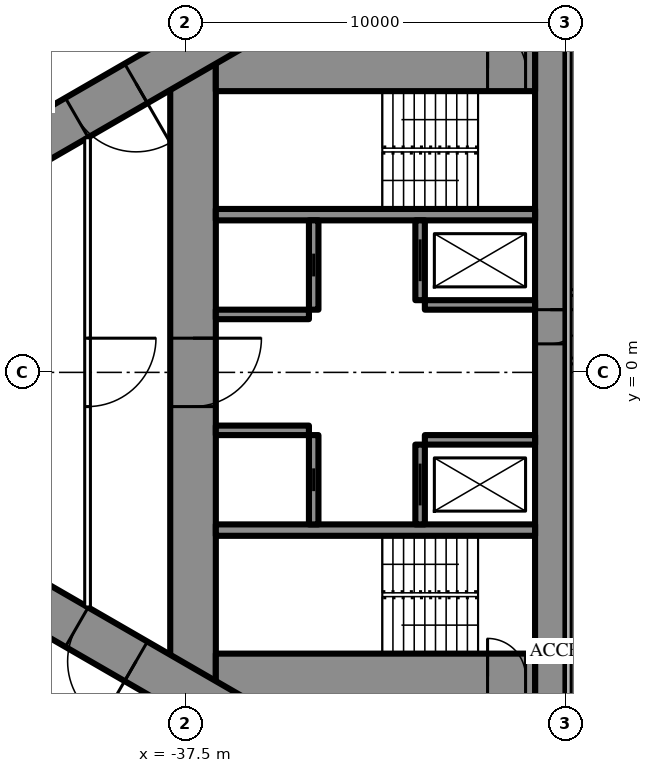
"""IFC4 building model, lengths in metres.
Left out: names, types, materials, properties, quantities, classifications, styles, units other than length and angle.
Written with IfcOpenShell. Run it as: python <this file> out.ifc"""

import sys

from ifc_helpers import new_model, si_unit, direction, frame, frame_2d, origin, place, context, subcontext, project, spatial, rectangle, extrude, element, fill, save


model = new_model("IFC4")
c1 = context("Model", 3, precision=1e-05, world=origin(), true_north=direction((0.0, 1.0)))
c2 = subcontext(c1, "Body", "Model", "MODEL_VIEW")
j1 = project(units=[si_unit("LENGTHUNIT", "METRE"), si_unit("PLANEANGLEUNIT", "RADIAN")], contexts=[c1])
p1 = place(None, origin())
s1 = spatial("IfcSite", under=j1, at=p1, CompositionType="ELEMENT")
p2 = place(p1, origin())
s2 = spatial("IfcBuilding", under=s1, at=p2, CompositionType="ELEMENT")
p3 = place(p2, frame((0.0, 0.0, 226.1)))
s3 = spatial("IfcBuildingStorey", under=s2, at=p3, CompositionType="ELEMENT", Elevation=226.1)
p4 = place(p3, frame((-27.9, 8.6, 0.0), z_axis=(0.0, 0.0, 1.0), x_axis=(0.0, -1.0, 0.0)))
e1 = element("IfcWall", 1, at=p4, inside=s3, PredefinedType="SHEAR", context=c2, shape_type="SweptSolid", body=[
    extrude(rectangle(XDim=17.2, YDim=0.8, at=frame_2d((8.6, 0.0))), origin(), (0.0, 0.0, 1.0), 3.6),
])
p5 = place(p4, frame((6.95, 0.0, 0.0)))
e2 = element("IfcOpeningElement", 2, at=p5, cuts=e1, PredefinedType="OPENING", context=c2, shape_type="SweptSolid", body=[
    extrude(rectangle(XDim=0.9, YDim=2.2, at=frame_2d((0.45, 1.1))), frame((0.0, 0.41, 0.0), z_axis=(0.0, -1.0, 0.0), x_axis=(1.0, 0.0, 0.0)), (0.0, 0.0, 1.0), 0.82),
])
p6 = place(p3, frame((-37.3, 8.6, 0.0), z_axis=(0.0, 0.0, 1.0), x_axis=(0.0, -1.0, 0.0)))
e3 = element("IfcWall", 3, at=p6, inside=s3, PredefinedType="SHEAR", context=c2, shape_type="SweptSolid", body=[
    extrude(rectangle(XDim=17.2, YDim=1.2, at=frame_2d((8.6, 0.0))), origin(), (0.0, 0.0, 1.0), 3.6),
])
p7 = place(p6, frame((7.7, 0.0, 0.0)))
e4 = element("IfcOpeningElement", 4, at=p7, cuts=e3, PredefinedType="OPENING", context=c2, shape_type="SweptSolid", body=[
    extrude(rectangle(XDim=1.8, YDim=2.2, at=frame_2d((0.9, 1.1))), frame((0.0, 0.61, 0.0), z_axis=(0.0, -1.0, 0.0), x_axis=(1.0, 0.0, 0.0)), (0.0, 0.0, 1.0), 1.22),
])
p8 = place(p3, frame((-28.3, 8.0, 0.0), z_axis=(0.0, 0.0, 1.0), x_axis=(-1.0, 0.0, 0.0)))
e5 = element("IfcWall", 5, at=p8, inside=s3, PredefinedType="SHEAR", context=c2, shape_type="SweptSolid", body=[
    extrude(rectangle(XDim=8.4, YDim=1.2, at=frame_2d((4.2, 0.0))), origin(), (0.0, 0.0, 1.0), 3.6),
])
p9 = place(p8, frame((0.25, 0.0, 0.0)))
e6 = element("IfcOpeningElement", 6, at=p9, cuts=e5, PredefinedType="OPENING", context=c2, shape_type="SweptSolid", body=[
    extrude(rectangle(XDim=1.0, YDim=2.2, at=frame_2d((0.5, 1.1))), frame((0.0, 0.61, 0.0), z_axis=(0.0, -1.0, 0.0), x_axis=(1.0, 0.0, 0.0)), (0.0, 0.0, 1.0), 1.22),
])
p10 = place(p3, frame((-28.3, -8.0, 0.0), z_axis=(0.0, 0.0, 1.0), x_axis=(-1.0, 0.0, 0.0)))
e7 = element("IfcWall", 7, at=p10, inside=s3, PredefinedType="SHEAR", context=c2, shape_type="SweptSolid", body=[
    extrude(rectangle(XDim=8.4, YDim=1.2, at=frame_2d((4.2, 0.0))), origin(), (0.0, 0.0, 1.0), 3.6),
])
p11 = place(p10, frame((0.25, 0.0, 0.0)))
e8 = element("IfcOpeningElement", 8, at=p11, cuts=e7, PredefinedType="OPENING", context=c2, shape_type="SweptSolid", body=[
    extrude(rectangle(XDim=1.0, YDim=2.2, at=frame_2d((0.5, 1.1))), frame((0.0, 0.61, 0.0), z_axis=(0.0, -1.0, 0.0), x_axis=(1.0, 0.0, 0.0)), (0.0, 0.0, 1.0), 1.22),
])
for number, where, z_axis, x_axis in (
    (9, (-28.3, 4.15, 0.0), (0.0, 0.0, 1.0), (-1.0, 0.0, 0.0)),
    (10, (-28.3, -4.15, 0.0), (0.0, 0.0, 1.0), (-1.0, 0.0, 0.0)),
):
    element("IfcWall", number, at=place(p3, frame(where, z_axis=z_axis, x_axis=x_axis)), inside=s3, PredefinedType="SHEAR", context=c2, shape_type="SweptSolid", body=[
        extrude(rectangle(XDim=8.4, YDim=0.3, at=frame_2d((4.2, 0.0))), origin(), (0.0, 0.0, 1.0), 3.6),
    ])
p12 = place(p3, frame((-31.325, 4.0, 0.0), z_axis=(0.0, 0.0, 1.0), x_axis=(0.0, -1.0, 0.0)))
e11 = element("IfcWall", 11, at=p12, inside=s3, PredefinedType="SHEAR", context=c2, shape_type="SweptSolid", body=[
    extrude(rectangle(XDim=2.1, YDim=0.25, at=frame_2d((1.05, 0.0))), origin(), (0.0, 0.0, 1.0), 3.6),
])
p13 = place(p12, frame((0.5, 0.0, 0.0)))
e12 = element("IfcOpeningElement", 12, at=p13, cuts=e11, PredefinedType="OPENING", context=c2, shape_type="SweptSolid", body=[
    extrude(rectangle(XDim=1.1, YDim=2.2, at=frame_2d((0.55, 1.1))), frame((0.0, 0.135, 0.0), z_axis=(0.0, -1.0, 0.0), x_axis=(1.0, 0.0, 0.0)), (0.0, 0.0, 1.0), 0.27),
])
p14 = place(p3, frame((-34.125, 4.0, 0.0), z_axis=(0.0, 0.0, 1.0), x_axis=(0.0, -1.0, 0.0)))
e13 = element("IfcWall", 13, at=p14, inside=s3, PredefinedType="SHEAR", context=c2, shape_type="SweptSolid", body=[
    extrude(rectangle(XDim=2.35, YDim=0.25, at=frame_2d((1.175, 0.0))), origin(), (0.0, 0.0, 1.0), 3.6),
])
p15 = place(p14, frame((0.875, 0.0, 0.0)))
e14 = element("IfcOpeningElement", 14, at=p15, cuts=e13, PredefinedType="OPENING", context=c2, shape_type="SweptSolid", body=[
    extrude(rectangle(XDim=0.6, YDim=2.0, at=frame_2d((0.3, 1.0))), frame((0.0, 0.135, 0.0), z_axis=(0.0, -1.0, 0.0), x_axis=(1.0, 0.0, 0.0)), (0.0, 0.0, 1.0), 0.27),
])
p16 = place(p3, frame((-28.3, 1.775, 0.0), z_axis=(0.0, 0.0, 1.0), x_axis=(-1.0, 0.0, 0.0)))
e15 = element("IfcWall", 15, at=p16, inside=s3, PredefinedType="SHEAR", context=c2, shape_type="SweptSolid", body=[
    extrude(rectangle(XDim=2.9, YDim=0.25, at=frame_2d((1.45, 0.0))), origin(), (0.0, 0.0, 1.0), 3.6),
])
p17 = place(p3, frame((-34.25, 1.525, 0.0), z_axis=(0.0, 0.0, 1.0), x_axis=(-1.0, 0.0, 0.0)))
e16 = element("IfcWall", 16, at=p17, inside=s3, PredefinedType="SHEAR", context=c2, shape_type="SweptSolid", body=[
    extrude(rectangle(XDim=2.45, YDim=0.25, at=frame_2d((1.225, 0.0))), origin(), (0.0, 0.0, 1.0), 3.6),
])
p18 = place(p3, frame((-31.325, -1.9, 0.0), z_axis=(0.0, 0.0, 1.0), x_axis=(0.0, -1.0, 0.0)))
e17 = element("IfcWall", 17, at=p18, inside=s3, PredefinedType="SHEAR", context=c2, shape_type="SweptSolid", body=[
    extrude(rectangle(XDim=2.1, YDim=0.25, at=frame_2d((1.05, 0.0))), origin(), (0.0, 0.0, 1.0), 3.6),
])
p19 = place(p18, frame((0.5, 0.0, 0.0)))
e18 = element("IfcOpeningElement", 18, at=p19, cuts=e17, PredefinedType="OPENING", context=c2, shape_type="SweptSolid", body=[
    extrude(rectangle(XDim=1.1, YDim=2.2, at=frame_2d((0.55, 1.1))), frame((0.0, 0.135, 0.0), z_axis=(0.0, -1.0, 0.0), x_axis=(1.0, 0.0, 0.0)), (0.0, 0.0, 1.0), 0.27),
])
p20 = place(p3, frame((-34.125, -1.65, 0.0), z_axis=(0.0, 0.0, 1.0), x_axis=(0.0, -1.0, 0.0)))
e19 = element("IfcWall", 19, at=p20, inside=s3, PredefinedType="SHEAR", context=c2, shape_type="SweptSolid", body=[
    extrude(rectangle(XDim=2.35, YDim=0.25, at=frame_2d((1.175, 0.0))), origin(), (0.0, 0.0, 1.0), 3.6),
])
p21 = place(p20, frame((0.875, 0.0, 0.0)))
e20 = element("IfcOpeningElement", 20, at=p21, cuts=e19, PredefinedType="OPENING", context=c2, shape_type="SweptSolid", body=[
    extrude(rectangle(XDim=0.6, YDim=2.0, at=frame_2d((0.3, 1.0))), frame((0.0, 0.135, 0.0), z_axis=(0.0, -1.0, 0.0), x_axis=(1.0, 0.0, 0.0)), (0.0, 0.0, 1.0), 0.27),
])
p22 = place(p3, frame((-28.3, -1.775, 0.0), z_axis=(0.0, 0.0, 1.0), x_axis=(-1.0, 0.0, 0.0)))
e21 = element("IfcWall", 21, at=p22, inside=s3, PredefinedType="SHEAR", context=c2, shape_type="SweptSolid", body=[
    extrude(rectangle(XDim=2.9, YDim=0.25, at=frame_2d((1.45, 0.0))), origin(), (0.0, 0.0, 1.0), 3.6),
])
p23 = place(p3, frame((-34.25, -1.525, 0.0), z_axis=(0.0, 0.0, 1.0), x_axis=(-1.0, 0.0, 0.0)))
e22 = element("IfcWall", 22, at=p23, inside=s3, PredefinedType="SHEAR", context=c2, shape_type="SweptSolid", body=[
    extrude(rectangle(XDim=2.45, YDim=0.25, at=frame_2d((1.225, 0.0))), origin(), (0.0, 0.0, 1.0), 3.6),
])
p24 = place(p3, frame((-27.2, 14.3, 0.0), z_axis=(0.0, 0.0, 1.0), x_axis=(-0.866026593062, -0.499997940104, 0.0)))
e23 = element("IfcWall", 23, at=p24, inside=s3, PredefinedType="SHEAR", context=c2, shape_type="SweptSolid", body=[
    extrude(rectangle(XDim=28.946, YDim=1.2, at=frame_2d((14.473, 0.0))), origin(), (0.0, 0.0, 1.0), 3.6),
])
p25 = place(p24, frame((4.6, 0.0, 0.0)))
e24 = element("IfcOpeningElement", 24, at=p25, cuts=e23, PredefinedType="OPENING", context=c2, shape_type="SweptSolid", body=[
    extrude(rectangle(XDim=1.0, YDim=2.2, at=frame_2d((0.5, 1.1))), frame((0.0, 0.61, 0.0), z_axis=(0.0, -1.0, 0.0), x_axis=(1.0, 0.0, 0.0)), (0.0, 0.0, 1.0), 1.22),
])
p26 = place(p24, frame((13.395, 0.0, 0.0)))
e25 = element("IfcOpeningElement", 25, at=p26, cuts=e23, PredefinedType="OPENING", context=c2, shape_type="SweptSolid", body=[
    extrude(rectangle(XDim=1.8, YDim=2.2, at=frame_2d((0.9, 1.1))), frame((0.0, 0.61, 0.0), z_axis=(0.0, -1.0, 0.0), x_axis=(1.0, 0.0, 0.0)), (0.0, 0.0, 1.0), 1.22),
])
p27 = place(p3, frame((-27.2, -14.3, 0.0), z_axis=(0.0, 0.0, 1.0), x_axis=(-0.866024021859, 0.500002393557, 0.0)))
e26 = element("IfcWall", 26, at=p27, inside=s3, PredefinedType="SHEAR", context=c2, shape_type="SweptSolid", body=[
    extrude(rectangle(XDim=27.907, YDim=1.2, at=frame_2d((13.954, 0.0))), origin(), (0.0, 0.0, 1.0), 3.6),
])
p28 = place(p27, frame((4.6, 0.0, 0.0)))
e27 = element("IfcOpeningElement", 27, at=p28, cuts=e26, PredefinedType="OPENING", context=c2, shape_type="SweptSolid", body=[
    extrude(rectangle(XDim=1.0, YDim=2.2, at=frame_2d((0.5, 1.1))), frame((0.0, 0.61, 0.0), z_axis=(0.0, -1.0, 0.0), x_axis=(1.0, 0.0, 0.0)), (0.0, 0.0, 1.0), 1.22),
])
p29 = place(p27, frame((13.395, 0.0, 0.0)))
e28 = element("IfcOpeningElement", 28, at=p29, cuts=e26, PredefinedType="OPENING", context=c2, shape_type="SweptSolid", body=[
    extrude(rectangle(XDim=1.8, YDim=2.2, at=frame_2d((0.9, 1.1))), frame((0.0, 0.61, 0.0), z_axis=(0.0, -1.0, 0.0), x_axis=(1.0, 0.0, 0.0)), (0.0, 0.0, 1.0), 1.22),
])
p30 = place(p3, frame((-28.737, 16.068, 0.0), z_axis=(0.0, 0.0, 1.0), x_axis=(-0.866023901326, -0.500002602325, 0.0)))
e29 = element("IfcWall", 29, at=p30, inside=s3, PredefinedType="PARTITIONING", context=c2, shape_type="SweptSolid", body=[
    extrude(rectangle(XDim=20.192, YDim=0.2, at=frame_2d((10.096, 0.0))), origin(), (0.0, 0.0, 1.0), 3.35),
])
p31 = place(p30, frame((1.08, 0.0, 0.0)))
e30 = element("IfcOpeningElement", 30, at=p31, cuts=e29, PredefinedType="OPENING", context=c2, shape_type="SweptSolid", body=[
    extrude(rectangle(XDim=1.8, YDim=2.04, at=frame_2d((0.9, 1.02))), frame((0.0, 0.11, 0.0), z_axis=(0.0, -1.0, 0.0), x_axis=(1.0, 0.0, 0.0)), (0.0, 0.0, 1.0), 0.22),
])
p32 = place(p30, frame((6.86, 0.0, 0.0)))
e31 = element("IfcOpeningElement", 31, at=p32, cuts=e29, PredefinedType="OPENING", context=c2, shape_type="SweptSolid", body=[
    extrude(rectangle(XDim=1.0, YDim=2.2, at=frame_2d((0.5, 1.1))), frame((0.0, 0.11, 0.0), z_axis=(0.0, -1.0, 0.0), x_axis=(1.0, 0.0, 0.0)), (0.0, 0.0, 1.0), 0.22),
])
p33 = place(p30, frame((18.867, 0.0, 0.0)))
e32 = element("IfcOpeningElement", 32, at=p33, cuts=e29, PredefinedType="OPENING", context=c2, shape_type="SweptSolid", body=[
    extrude(rectangle(XDim=0.95, YDim=2.2, at=frame_2d((0.475, 1.1))), frame((0.0, 0.11, 0.0), z_axis=(0.0, -1.0, 0.0), x_axis=(1.0, 0.0, 0.0)), (0.0, 0.0, 1.0), 0.22),
])
p34 = place(p3, frame((-40.075, 6.174, 0.0), z_axis=(0.0, 0.0, 1.0), x_axis=(0.0, -1.0, 0.0)))
e33 = element("IfcWall", 33, at=p34, inside=s3, PredefinedType="PARTITIONING", context=c2, shape_type="SweptSolid", body=[
    extrude(rectangle(XDim=12.348, YDim=0.15, at=frame_2d((6.174, 0.0))), origin(), (0.0, 0.0, 1.0), 3.35),
])
p35 = place(p34, frame((5.274, 0.0, 0.0)))
e34 = element("IfcOpeningElement", 34, at=p35, cuts=e33, PredefinedType="OPENING", context=c2, shape_type="SweptSolid", body=[
    extrude(rectangle(XDim=1.8, YDim=2.2, at=frame_2d((0.9, 1.1))), frame((0.0, 0.085, 0.0), z_axis=(0.0, -1.0, 0.0), x_axis=(1.0, 0.0, 0.0)), (0.0, 0.0, 1.0), 0.17),
])
p36 = place(p3, frame((-27.5, 0.3, 0.0), z_axis=(0.0, 0.0, 1.0), x_axis=(1.0, 0.0, 0.0)))
e35 = element("IfcWall", 35, at=p36, inside=s3, PredefinedType="PARTITIONING", context=c2, shape_type="SweptSolid", body=[
    extrude(rectangle(XDim=55.0, YDim=0.15, at=frame_2d((27.5, 0.0))), origin(), (0.0, 0.0, 1.0), 2.4),
])
p37 = place(p36, frame((1.575, 0.0, 0.0)))
e36 = element("IfcOpeningElement", 36, at=p37, cuts=e35, PredefinedType="OPENING", context=c2, shape_type="SweptSolid", body=[
    extrude(rectangle(XDim=1.0, YDim=2.2, at=frame_2d((0.5, 1.1))), frame((0.0, 0.085, 0.0), z_axis=(0.0, -1.0, 0.0), x_axis=(1.0, 0.0, 0.0)), (0.0, 0.0, 1.0), 0.17),
])
p38 = place(p36, frame((7.525, 0.0, 0.0)))
e37 = element("IfcOpeningElement", 37, at=p38, cuts=e35, PredefinedType="OPENING", context=c2, shape_type="SweptSolid", body=[
    extrude(rectangle(XDim=1.05, YDim=2.4, at=frame_2d((0.525, 1.2))), frame((0.0, 0.085, 0.0), z_axis=(0.0, -1.0, 0.0), x_axis=(1.0, 0.0, 0.0)), (0.0, 0.0, 1.0), 0.17),
])
p39 = place(p36, frame((18.525, 0.0, 0.0)))
e38 = element("IfcOpeningElement", 38, at=p39, cuts=e35, PredefinedType="OPENING", context=c2, shape_type="SweptSolid", body=[
    extrude(rectangle(XDim=1.05, YDim=2.4, at=frame_2d((0.525, 1.2))), frame((0.0, 0.085, 0.0), z_axis=(0.0, -1.0, 0.0), x_axis=(1.0, 0.0, 0.0)), (0.0, 0.0, 1.0), 0.17),
])
p40 = place(p36, frame((24.025, 0.0, 0.0)))
e39 = element("IfcOpeningElement", 39, at=p40, cuts=e35, PredefinedType="OPENING", context=c2, shape_type="SweptSolid", body=[
    extrude(rectangle(XDim=1.05, YDim=2.4, at=frame_2d((0.525, 1.2))), frame((0.0, 0.085, 0.0), z_axis=(0.0, -1.0, 0.0), x_axis=(1.0, 0.0, 0.0)), (0.0, 0.0, 1.0), 0.17),
])
p41 = place(p36, frame((35.025, 0.0, 0.0)))
e40 = element("IfcOpeningElement", 40, at=p41, cuts=e35, PredefinedType="OPENING", context=c2, shape_type="SweptSolid", body=[
    extrude(rectangle(XDim=1.05, YDim=2.4, at=frame_2d((0.525, 1.2))), frame((0.0, 0.085, 0.0), z_axis=(0.0, -1.0, 0.0), x_axis=(1.0, 0.0, 0.0)), (0.0, 0.0, 1.0), 0.17),
])
p42 = place(p36, frame((40.525, 0.0, 0.0)))
e41 = element("IfcOpeningElement", 41, at=p42, cuts=e35, PredefinedType="OPENING", context=c2, shape_type="SweptSolid", body=[
    extrude(rectangle(XDim=1.05, YDim=2.4, at=frame_2d((0.525, 1.2))), frame((0.0, 0.085, 0.0), z_axis=(0.0, -1.0, 0.0), x_axis=(1.0, 0.0, 0.0)), (0.0, 0.0, 1.0), 0.17),
])
p43 = place(p36, frame((52.525, 0.0, 0.0)))
e42 = element("IfcOpeningElement", 42, at=p43, cuts=e35, PredefinedType="OPENING", context=c2, shape_type="SweptSolid", body=[
    extrude(rectangle(XDim=1.05, YDim=2.4, at=frame_2d((0.525, 1.2))), frame((0.0, 0.085, 0.0), z_axis=(0.0, -1.0, 0.0), x_axis=(1.0, 0.0, 0.0)), (0.0, 0.0, 1.0), 0.17),
])
p44 = place(p3, frame((-27.5, 2.1, 0.0), z_axis=(0.0, 0.0, 1.0), x_axis=(1.0, 0.0, 0.0)))
e43 = element("IfcWall", 43, at=p44, inside=s3, PredefinedType="PARTITIONING", context=c2, shape_type="SweptSolid", body=[
    extrude(rectangle(XDim=22.35, YDim=0.15, at=frame_2d((11.175, 0.0))), origin(), (0.0, 0.0, 1.0), 3.4),
])
p45 = place(p44, frame((2.025, 0.0, 0.0)))
e44 = element("IfcOpeningElement", 44, at=p45, cuts=e43, PredefinedType="OPENING", context=c2, shape_type="SweptSolid", body=[
    extrude(rectangle(XDim=1.05, YDim=2.4, at=frame_2d((0.525, 1.2))), frame((0.0, 0.085, 0.0), z_axis=(0.0, -1.0, 0.0), x_axis=(1.0, 0.0, 0.0)), (0.0, 0.0, 1.0), 0.17),
])
p46 = place(p44, frame((7.525, 0.0, 0.0)))
e45 = element("IfcOpeningElement", 45, at=p46, cuts=e43, PredefinedType="OPENING", context=c2, shape_type="SweptSolid", body=[
    extrude(rectangle(XDim=1.05, YDim=2.4, at=frame_2d((0.525, 1.2))), frame((0.0, 0.085, 0.0), z_axis=(0.0, -1.0, 0.0), x_axis=(1.0, 0.0, 0.0)), (0.0, 0.0, 1.0), 0.17),
])
p47 = place(p44, frame((13.025, 0.0, 0.0)))
e46 = element("IfcOpeningElement", 46, at=p47, cuts=e43, PredefinedType="OPENING", context=c2, shape_type="SweptSolid", body=[
    extrude(rectangle(XDim=1.05, YDim=2.4, at=frame_2d((0.525, 1.2))), frame((0.0, 0.085, 0.0), z_axis=(0.0, -1.0, 0.0), x_axis=(1.0, 0.0, 0.0)), (0.0, 0.0, 1.0), 0.17),
])
p48 = place(p44, frame((18.525, 0.0, 0.0)))
e47 = element("IfcOpeningElement", 47, at=p48, cuts=e43, PredefinedType="OPENING", context=c2, shape_type="SweptSolid", body=[
    extrude(rectangle(XDim=1.05, YDim=2.4, at=frame_2d((0.525, 1.2))), frame((0.0, 0.085, 0.0), z_axis=(0.0, -1.0, 0.0), x_axis=(1.0, 0.0, 0.0)), (0.0, 0.0, 1.0), 0.17),
])
p49 = place(p3, frame((-39.758, -11.697, 0.0), z_axis=(0.0, 0.0, 1.0), x_axis=(-0.866024194504, 0.500002094529, 0.0)))
e48 = element("IfcWall", 48, at=p49, inside=s3, PredefinedType="PARTITIONING", context=c2, shape_type="SweptSolid", body=[
    extrude(rectangle(XDim=6.6, YDim=0.25, at=frame_2d((3.3, 0.0))), origin(), (0.0, 0.0, 1.0), 3.35),
])
p50 = place(p49, frame((0.75, 0.0, 0.0)))
e49 = element("IfcOpeningElement", 49, at=p50, cuts=e48, PredefinedType="OPENING", context=c2, shape_type="SweptSolid", body=[
    extrude(rectangle(XDim=1.1, YDim=2.2, at=frame_2d((0.55, 1.1))), frame((0.0, 0.135, 0.0), z_axis=(0.0, -1.0, 0.0), x_axis=(1.0, 0.0, 0.0)), (0.0, 0.0, 1.0), 0.27),
])
p51 = place(p49, frame((2.75, 0.0, 0.0)))
e50 = element("IfcOpeningElement", 50, at=p51, cuts=e48, PredefinedType="OPENING", context=c2, shape_type="SweptSolid", body=[
    extrude(rectangle(XDim=1.1, YDim=2.2, at=frame_2d((0.55, 1.1))), frame((0.0, 0.135, 0.0), z_axis=(0.0, -1.0, 0.0), x_axis=(1.0, 0.0, 0.0)), (0.0, 0.0, 1.0), 0.27),
])
p52 = place(p49, frame((4.75, 0.0, 0.0)))
e51 = element("IfcOpeningElement", 51, at=p52, cuts=e48, PredefinedType="OPENING", context=c2, shape_type="SweptSolid", body=[
    extrude(rectangle(XDim=1.1, YDim=2.2, at=frame_2d((0.55, 1.1))), frame((0.0, 0.135, 0.0), z_axis=(0.0, -1.0, 0.0), x_axis=(1.0, 0.0, 0.0)), (0.0, 0.0, 1.0), 0.27),
])
p53 = place(p35, origin())
e52 = element("IfcDoor", 52, at=p53, inside=s3, OperationType="DOUBLE_DOOR_SINGLE_SWING", PredefinedType="DOOR", context=c2, shape_type="SweptSolid", body=[
    extrude(rectangle(XDim=1.8, YDim=2.2, at=frame_2d((0.9, 1.1))), frame((0.0, 0.025, 0.0), z_axis=(0.0, -1.0, 0.0), x_axis=(1.0, 0.0, 0.0)), (0.0, 0.0, 1.0), 0.05),
])
fill(e34, e52)
p54 = place(p26, origin())
e53 = element("IfcDoor", 53, at=p54, inside=s3, OperationType="DOUBLE_DOOR_SINGLE_SWING", PredefinedType="DOOR", context=c2, shape_type="SweptSolid", body=[
    extrude(rectangle(XDim=1.8, YDim=2.2, at=frame_2d((0.9, 1.1))), frame((0.0, 0.025, 0.0), z_axis=(0.0, -1.0, 0.0), x_axis=(1.0, 0.0, 0.0)), (0.0, 0.0, 1.0), 0.05),
])
fill(e25, e53)
p55 = place(p29, origin())
e54 = element("IfcDoor", 54, at=p55, inside=s3, OperationType="DOUBLE_DOOR_SINGLE_SWING", PredefinedType="DOOR", context=c2, shape_type="SweptSolid", body=[
    extrude(rectangle(XDim=1.8, YDim=2.2, at=frame_2d((0.9, 1.1))), frame((0.0, 0.025, 0.0), z_axis=(0.0, -1.0, 0.0), x_axis=(1.0, 0.0, 0.0)), (0.0, 0.0, 1.0), 0.05),
])
fill(e28, e54)
p56 = place(p7, origin())
e55 = element("IfcDoor", 55, at=p56, inside=s3, OperationType="DOUBLE_DOOR_SINGLE_SWING", PredefinedType="DOOR", context=c2, shape_type="SweptSolid", body=[
    extrude(rectangle(XDim=1.8, YDim=2.2, at=frame_2d((0.9, 1.1))), frame((0.0, 0.025, 0.0), z_axis=(0.0, -1.0, 0.0), x_axis=(1.0, 0.0, 0.0)), (0.0, 0.0, 1.0), 0.05),
])
fill(e4, e55)
p57 = place(p9, origin())
e56 = element("IfcDoor", 56, at=p57, inside=s3, OperationType="SINGLE_SWING_RIGHT", PredefinedType="DOOR", context=c2, shape_type="SweptSolid", body=[
    extrude(rectangle(XDim=1.0, YDim=2.2, at=frame_2d((0.5, 1.1))), frame((0.0, 0.025, 0.0), z_axis=(0.0, -1.0, 0.0), x_axis=(1.0, 0.0, 0.0)), (0.0, 0.0, 1.0), 0.05),
])
fill(e6, e56)
p58 = place(p11, origin())
e57 = element("IfcDoor", 57, at=p58, inside=s3, OperationType="SINGLE_SWING_RIGHT", PredefinedType="DOOR", context=c2, shape_type="SweptSolid", body=[
    extrude(rectangle(XDim=1.0, YDim=2.2, at=frame_2d((0.5, 1.1))), frame((0.0, 0.025, 0.0), z_axis=(0.0, -1.0, 0.0), x_axis=(1.0, 0.0, 0.0)), (0.0, 0.0, 1.0), 0.05),
])
fill(e8, e57)
p59 = place(p5, origin())
e58 = element("IfcDoor", 58, at=p59, inside=s3, OperationType="SINGLE_SWING_LEFT", PredefinedType="DOOR", context=c2, shape_type="SweptSolid", body=[
    extrude(rectangle(XDim=0.9, YDim=2.2, at=frame_2d((0.45, 1.1))), frame((0.0, 0.025, 0.0), z_axis=(0.0, -1.0, 0.0), x_axis=(1.0, 0.0, 0.0)), (0.0, 0.0, 1.0), 0.05),
])
fill(e2, e58)
p60 = place(p13, origin())
e59 = element("IfcDoor", 59, at=p60, inside=s3, OperationType="SLIDING_TO_LEFT", PredefinedType="USERDEFINED", context=c2, shape_type="SweptSolid", body=[
    extrude(rectangle(XDim=1.1, YDim=2.2, at=frame_2d((0.55, 1.1))), frame((0.0, 0.025, 0.0), z_axis=(0.0, -1.0, 0.0), x_axis=(1.0, 0.0, 0.0)), (0.0, 0.0, 1.0), 0.05),
])
fill(e12, e59)
p61 = place(p19, origin())
e60 = element("IfcDoor", 60, at=p61, inside=s3, OperationType="SLIDING_TO_LEFT", PredefinedType="USERDEFINED", context=c2, shape_type="SweptSolid", body=[
    extrude(rectangle(XDim=1.1, YDim=2.2, at=frame_2d((0.55, 1.1))), frame((0.0, 0.025, 0.0), z_axis=(0.0, -1.0, 0.0), x_axis=(1.0, 0.0, 0.0)), (0.0, 0.0, 1.0), 0.05),
])
fill(e18, e60)
p62 = place(p15, origin())
e61 = element("IfcDoor", 61, at=p62, inside=s3, OperationType="SLIDING_TO_LEFT", PredefinedType="DOOR", context=c2, shape_type="SweptSolid", body=[
    extrude(rectangle(XDim=0.6, YDim=2.0, at=frame_2d((0.3, 1.0))), frame((0.0, 0.025, 0.0), z_axis=(0.0, -1.0, 0.0), x_axis=(1.0, 0.0, 0.0)), (0.0, 0.0, 1.0), 0.05),
])
fill(e14, e61)
p63 = place(p21, origin())
e62 = element("IfcDoor", 62, at=p63, inside=s3, OperationType="SLIDING_TO_LEFT", PredefinedType="DOOR", context=c2, shape_type="SweptSolid", body=[
    extrude(rectangle(XDim=0.6, YDim=2.0, at=frame_2d((0.3, 1.0))), frame((0.0, 0.025, 0.0), z_axis=(0.0, -1.0, 0.0), x_axis=(1.0, 0.0, 0.0)), (0.0, 0.0, 1.0), 0.05),
])
fill(e20, e62)
save(model, sys.argv[1])
